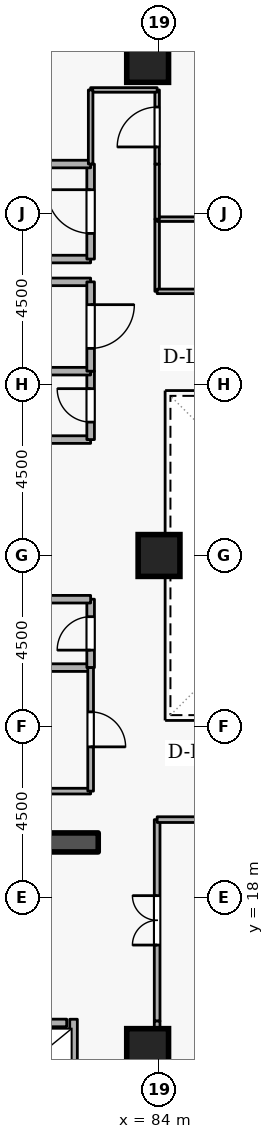
"""IFC4 building model, lengths in metres.
Left out: names, types, materials, properties, quantities, classifications, styles, units other than length and angle.
Written with IfcOpenShell. Run it as: python <this file> out.ifc"""

import sys

from ifc_helpers import new_model, si_unit, direction, frame, frame_2d, origin, origin_2d, place, context, subcontext, project, spatial, rectangle, extrude, element, fill, save


model = new_model("IFC4")
c1 = context("Model", 3, precision=1e-05, world=origin(), true_north=direction((0.0, 1.0)))
c2 = subcontext(c1, "Body", "Model", "MODEL_VIEW")
j1 = project(units=[si_unit("LENGTHUNIT", "METRE"), si_unit("PLANEANGLEUNIT", "RADIAN")], contexts=[c1])
p1 = place(None, origin())
s1 = spatial("IfcSite", under=j1, at=p1, CompositionType="ELEMENT")
p2 = place(p1, origin())
s2 = spatial("IfcBuilding", under=s1, at=p2, CompositionType="ELEMENT")
p3 = place(p2, frame((0.0, 0.0, 196.5)))
s3 = spatial("IfcBuildingStorey", under=s2, at=p3, CompositionType="ELEMENT", Elevation=196.5)
p4 = place(p3, frame((76.6, 19.45, 0.0), z_axis=(0.0, 0.0, 1.0), x_axis=(1.0, 0.0, 0.0)))
e1 = element("IfcWall", 1, at=p4, inside=s3, PredefinedType="SHEAR", context=c2, shape_type="SweptSolid", body=[
    extrude(rectangle(XDim=5.8, YDim=0.5, at=frame_2d((2.9, 0.0))), origin(), (0.0, 0.0, 1.0), 3.6),
])
for number, where, z_axis, x_axis in (
    (2, (83.7, 14.0, 0.0), (0.0, 0.0, 1.0), (1.0, 0.0, 0.0)),
    (3, (83.7, 40.0, 0.0), (0.0, 0.0, 1.0), (1.0, 0.0, 0.0)),
    (4, (84.0, 27.0, 0.0), (0.0, 0.0, 1.0), (1.0, 0.0, 0.0)),
):
    element("IfcColumn", number, at=place(p3, frame(where, z_axis=z_axis, x_axis=x_axis)), inside=s3, PredefinedType="COLUMN", context=c2, shape_type="SweptSolid", body=[
        extrude(rectangle(XDim=1.1, YDim=1.1, at=origin_2d()), origin(), (0.0, 0.0, 1.0), 3.6),
    ])
p5 = place(p3, frame((79.63, 14.7, 0.0), z_axis=(0.0, 0.0, 1.0), x_axis=(1.0, 0.0, 0.0)))
e5 = element("IfcWall", 5, at=p5, inside=s3, PredefinedType="STANDARD", context=c2, shape_type="SweptSolid", body=[
    extrude(rectangle(XDim=1.94, YDim=0.2, at=frame_2d((0.97, 0.0))), origin(), (0.0, 0.0, 1.0), 3.32),
])
p6 = place(p5, frame((0.46, 0.0, 0.0)))
e6 = element("IfcOpeningElement", 6, at=p6, cuts=e5, PredefinedType="OPENING", context=c2, shape_type="SweptSolid", body=[
    extrude(rectangle(XDim=1.02, YDim=2.06, at=frame_2d((0.51, 1.03))), frame((0.0, 0.11, 0.0), z_axis=(0.0, -1.0, 0.0), x_axis=(1.0, 0.0, 0.0)), (0.0, 0.0, 1.0), 0.22),
])
p7 = place(p3, frame((81.75, 12.612, 0.0), z_axis=(0.0, 0.0, 1.0), x_axis=(0.0, 1.0, 0.0)))
e7 = element("IfcWall", 7, at=p7, inside=s3, PredefinedType="STANDARD", context=c2, shape_type="SweptSolid", body=[
    extrude(rectangle(XDim=2.186, YDim=0.2, at=frame_2d((1.093, 0.0))), origin(), (0.0, 0.0, 1.0), 3.32),
])
p8 = place(p3, frame((79.9, 34.8, 0.0), z_axis=(0.0, 0.0, 1.0), x_axis=(1.0, 0.0, 0.0)))
e8 = element("IfcWall", 8, at=p8, inside=s3, PredefinedType="STANDARD", context=c2, shape_type="SweptSolid", body=[
    extrude(rectangle(XDim=2.3, YDim=0.2, at=frame_2d((1.15, 0.0))), origin(), (0.0, 0.0, 1.0), 2.525),
])
p9 = place(p3, frame((82.2, 34.8, 0.0), z_axis=(0.0, 0.0, 1.0), x_axis=(0.0, 1.0, 0.0)))
e9 = element("IfcWall", 9, at=p9, inside=s3, PredefinedType="STANDARD", context=c2, shape_type="SweptSolid", body=[
    extrude(rectangle(XDim=2.5, YDim=0.2, at=frame_2d((1.25, 0.0))), origin(), (0.0, 0.0, 1.0), 3.32),
])
p10 = place(p9, frame((0.675, 0.0, 0.0)))
e10 = element("IfcOpeningElement", 10, at=p10, cuts=e9, PredefinedType="OPENING", context=c2, shape_type="SweptSolid", body=[
    extrude(rectangle(XDim=1.15, YDim=2.1, at=frame_2d((0.575, 1.05))), frame((0.0, 0.11, 0.0), z_axis=(0.0, -1.0, 0.0), x_axis=(1.0, 0.0, 0.0)), (0.0, 0.0, 1.0), 0.22),
])
p11 = place(p3, frame((82.2, 37.3, 0.0), z_axis=(0.0, 0.0, 1.0), x_axis=(-1.0, 0.0, 0.0)))
e11 = element("IfcWall", 11, at=p11, inside=s3, PredefinedType="STANDARD", context=c2, shape_type="SweptSolid", body=[
    extrude(rectangle(XDim=5.7, YDim=0.2, at=frame_2d((2.85, 0.0))), origin(), (0.0, 0.0, 1.0), 3.32),
])
p12 = place(p3, frame((80.15, 24.05, 0.0), z_axis=(0.0, 0.0, 1.0), x_axis=(1.0, 0.0, 0.0)))
e12 = element("IfcWall", 12, at=p12, inside=s3, PredefinedType="STANDARD", context=c2, shape_type="SweptSolid", body=[
    extrude(rectangle(XDim=2.05, YDim=0.2, at=frame_2d((1.025, 0.0))), origin(), (0.0, 0.0, 1.0), 3.32),
])
p13 = place(p3, frame((82.2, 24.05, 0.0), z_axis=(0.0, 0.0, 1.0), x_axis=(0.0, 1.0, 0.0)))
e13 = element("IfcWall", 13, at=p13, inside=s3, PredefinedType="STANDARD", context=c2, shape_type="SweptSolid", body=[
    extrude(rectangle(XDim=1.8, YDim=0.2, at=frame_2d((0.9, 0.0))), origin(), (0.0, 0.0, 1.0), 3.32),
])
p14 = place(p13, frame((0.46, 0.0, 0.0)))
e14 = element("IfcOpeningElement", 14, at=p14, cuts=e13, PredefinedType="OPENING", context=c2, shape_type="SweptSolid", body=[
    extrude(rectangle(XDim=0.88, YDim=2.04, at=frame_2d((0.44, 1.02))), frame((0.0, 0.11, 0.0), z_axis=(0.0, -1.0, 0.0), x_axis=(1.0, 0.0, 0.0)), (0.0, 0.0, 1.0), 0.22),
])
for number, where, z_axis, x_axis in (
    (15, (82.2, 25.85, 0.0), (0.0, 0.0, 1.0), (-1.0, 0.0, 0.0)),
    (16, (80.15, 30.05, 0.0), (0.0, 0.0, 1.0), (1.0, 0.0, 0.0)),
):
    element("IfcWall", number, at=place(p3, frame(where, z_axis=z_axis, x_axis=x_axis)), inside=s3, PredefinedType="STANDARD", context=c2, shape_type="SweptSolid", body=[
        extrude(rectangle(XDim=2.05, YDim=0.2, at=frame_2d((1.025, 0.0))), origin(), (0.0, 0.0, 1.0), 3.32),
    ])
p15 = place(p3, frame((82.2, 30.05, 0.0), z_axis=(0.0, 0.0, 1.0), x_axis=(0.0, 1.0, 0.0)))
e17 = element("IfcWall", 17, at=p15, inside=s3, PredefinedType="STANDARD", context=c2, shape_type="SweptSolid", body=[
    extrude(rectangle(XDim=1.8, YDim=0.2, at=frame_2d((0.9, 0.0))), origin(), (0.0, 0.0, 1.0), 3.32),
])
p16 = place(p15, frame((0.46, 0.0, 0.0)))
e18 = element("IfcOpeningElement", 18, at=p16, cuts=e17, PredefinedType="OPENING", context=c2, shape_type="SweptSolid", body=[
    extrude(rectangle(XDim=0.88, YDim=2.04, at=frame_2d((0.44, 1.02))), frame((0.0, 0.11, 0.0), z_axis=(0.0, -1.0, 0.0), x_axis=(1.0, 0.0, 0.0)), (0.0, 0.0, 1.0), 0.22),
])
p17 = place(p3, frame((82.2, 31.85, 0.0), z_axis=(0.0, 0.0, 1.0), x_axis=(-1.0, 0.0, 0.0)))
e19 = element("IfcWall", 19, at=p17, inside=s3, PredefinedType="STANDARD", context=c2, shape_type="SweptSolid", body=[
    extrude(rectangle(XDim=2.05, YDim=0.2, at=frame_2d((1.025, 0.0))), origin(), (0.0, 0.0, 1.0), 3.32),
])
p18 = place(p3, frame((80.15, 34.2, 0.0), z_axis=(0.0, 0.0, 1.0), x_axis=(1.0, 0.0, 0.0)))
e20 = element("IfcWall", 20, at=p18, inside=s3, PredefinedType="STANDARD", context=c2, shape_type="SweptSolid", body=[
    extrude(rectangle(XDim=2.05, YDim=0.2, at=frame_2d((1.025, 0.0))), origin(), (0.0, 0.0, 1.0), 2.525),
])
p19 = place(p3, frame((82.2, 34.2, 0.0), z_axis=(0.0, 0.0, 1.0), x_axis=(0.0, -1.0, 0.0)))
e21 = element("IfcWall", 21, at=p19, inside=s3, PredefinedType="STANDARD", context=c2, shape_type="SweptSolid", body=[
    extrude(rectangle(XDim=2.35, YDim=0.2, at=frame_2d((1.175, 0.0))), origin(), (0.0, 0.0, 1.0), 3.32),
])
p20 = place(p19, frame((0.6, 0.0, 0.0)))
e22 = element("IfcOpeningElement", 22, at=p20, cuts=e21, PredefinedType="OPENING", context=c2, shape_type="SweptSolid", body=[
    extrude(rectangle(XDim=1.15, YDim=2.1, at=frame_2d((0.575, 1.05))), frame((0.0, 0.11, 0.0), z_axis=(0.0, -1.0, 0.0), x_axis=(1.0, 0.0, 0.0)), (0.0, 0.0, 1.0), 0.22),
])
p21 = place(p3, frame((82.2, 20.8, 0.0), z_axis=(0.0, 0.0, 1.0), x_axis=(-1.0, 0.0, 0.0)))
e23 = element("IfcWall", 23, at=p21, inside=s3, PredefinedType="PARTITIONING", context=c2, shape_type="SweptSolid", body=[
    extrude(rectangle(XDim=2.05, YDim=0.15, at=frame_2d((1.025, 0.0))), origin(), (0.0, 0.0, 1.0), 3.32),
])
p22 = place(p3, frame((82.2, 24.05, 0.0), z_axis=(0.0, 0.0, 1.0), x_axis=(0.0, -1.0, 0.0)))
e24 = element("IfcWall", 24, at=p22, inside=s3, PredefinedType="PARTITIONING", context=c2, shape_type="SweptSolid", body=[
    extrude(rectangle(XDim=3.25, YDim=0.15, at=frame_2d((1.625, 0.0))), origin(), (0.0, 0.0, 1.0), 3.32),
])
p23 = place(p22, frame((1.165, 0.0, 0.0)))
e25 = element("IfcOpeningElement", 25, at=p23, cuts=e24, PredefinedType="OPENING", context=c2, shape_type="SweptSolid", body=[
    extrude(rectangle(XDim=0.92, YDim=2.08, at=frame_2d((0.46, 1.04))), frame((0.0, 0.085, 0.0), z_axis=(0.0, -1.0, 0.0), x_axis=(1.0, 0.0, 0.0)), (0.0, 0.0, 1.0), 0.17),
])
p24 = place(p3, frame((83.95, 14.75, 0.0), z_axis=(0.0, 0.0, 1.0), x_axis=(0.0, 1.0, 0.0)))
e26 = element("IfcWall", 26, at=p24, inside=s3, PredefinedType="PARTITIONING", context=c2, shape_type="SweptSolid", body=[
    extrude(rectangle(XDim=5.3, YDim=0.15, at=frame_2d((2.65, 0.0))), origin(), (0.0, 0.0, 1.0), 3.32),
])
p25 = place(p24, frame((2.0, 0.0, 0.0)))
e27 = element("IfcOpeningElement", 27, at=p25, cuts=e26, PredefinedType="OPENING", context=c2, shape_type="SweptSolid", body=[
    extrude(rectangle(XDim=1.3, YDim=2.12, at=frame_2d((0.65, 1.06))), frame((0.0, 0.085, 0.0), z_axis=(0.0, -1.0, 0.0), x_axis=(1.0, 0.0, 0.0)), (0.0, 0.0, 1.0), 0.17),
])
p26 = place(p3, frame((83.95, 20.05, 0.0), z_axis=(0.0, 0.0, 1.0), x_axis=(1.0, 0.0, 0.0)))
e28 = element("IfcWall", 28, at=p26, inside=s3, PredefinedType="PARTITIONING", context=c2, shape_type="SweptSolid", body=[
    extrude(rectangle(XDim=2.25, YDim=0.15, at=frame_2d((1.125, 0.0))), origin(), (0.0, 0.0, 1.0), 3.32),
])
p27 = place(p3, frame((83.95, 12.4, 0.0), z_axis=(0.0, 0.0, 1.0), x_axis=(0.0, 1.0, 0.0)))
e29 = element("IfcWall", 29, at=p27, inside=s3, PredefinedType="PARTITIONING", context=c2, shape_type="SweptSolid", body=[
    extrude(rectangle(XDim=2.35, YDim=0.15, at=frame_2d((1.175, 0.0))), origin(), (0.0, 0.0, 1.0), 3.32),
])
p28 = place(p3, frame((83.95, 33.95, 0.0), z_axis=(0.0, 0.0, 1.0), x_axis=(0.0, 1.0, 0.0)))
e30 = element("IfcWall", 30, at=p28, inside=s3, PredefinedType="PARTITIONING", context=c2, shape_type="SweptSolid", body=[
    extrude(rectangle(XDim=1.9, YDim=0.12, at=frame_2d((0.95, 0.0))), origin(), (0.0, 0.0, 1.0), 3.32),
])
p29 = place(p3, frame((83.95, 35.85, 0.0), z_axis=(0.0, 0.0, 1.0), x_axis=(1.0, 0.0, 0.0)))
e31 = element("IfcWall", 31, at=p29, inside=s3, PredefinedType="PARTITIONING", context=c2, shape_type="SweptSolid", body=[
    extrude(rectangle(XDim=4.55, YDim=0.12, at=frame_2d((2.275, 0.0))), origin(), (0.0, 0.0, 1.0), 3.32),
])
p30 = place(p3, frame((88.5, 33.95, 0.0), z_axis=(0.0, 0.0, 1.0), x_axis=(-1.0, 0.0, 0.0)))
e32 = element("IfcWall", 32, at=p30, inside=s3, PredefinedType="PARTITIONING", context=c2, shape_type="SweptSolid", body=[
    extrude(rectangle(XDim=4.55, YDim=0.12, at=frame_2d((2.275, 0.0))), origin(), (0.0, 0.0, 1.0), 3.32),
])
p31 = place(p30, frame((1.8, 0.0, 0.0)))
e33 = element("IfcOpeningElement", 33, at=p31, cuts=e32, PredefinedType="OPENING", context=c2, shape_type="SweptSolid", body=[
    extrude(rectangle(XDim=0.95, YDim=2.1, at=frame_2d((0.475, 1.05))), frame((0.0, 0.07, 0.0), z_axis=(0.0, -1.0, 0.0), x_axis=(1.0, 0.0, 0.0)), (0.0, 0.0, 1.0), 0.14),
])
p32 = place(p3, frame((83.95, 35.85, 0.0), z_axis=(0.0, 0.0, 1.0), x_axis=(0.0, 1.0, 0.0)))
e34 = element("IfcWall", 34, at=p32, inside=s3, PredefinedType="PARTITIONING", context=c2, shape_type="SweptSolid", body=[
    extrude(rectangle(XDim=1.45, YDim=0.12, at=frame_2d((0.725, 0.0))), origin(), (0.0, 0.0, 1.0), 3.32),
])
p33 = place(p3, frame((83.95, 37.3, 0.0), z_axis=(0.0, 0.0, 1.0), x_axis=(0.0, 1.0, 0.0)))
e35 = element("IfcWall", 35, at=p33, inside=s3, PredefinedType="PARTITIONING", context=c2, shape_type="SweptSolid", body=[
    extrude(rectangle(XDim=1.95, YDim=0.12, at=frame_2d((0.975, 0.0))), origin(), (0.0, 0.0, 1.0), 3.32),
])
p34 = place(p33, frame((0.45, 0.0, 0.0)))
e36 = element("IfcOpeningElement", 36, at=p34, cuts=e35, PredefinedType="OPENING", context=c2, shape_type="SweptSolid", body=[
    extrude(rectangle(XDim=1.05, YDim=2.1, at=frame_2d((0.525, 1.05))), frame((0.0, 0.07, 0.0), z_axis=(0.0, -1.0, 0.0), x_axis=(1.0, 0.0, 0.0)), (0.0, 0.0, 1.0), 0.14),
])
p35 = place(p3, frame((83.95, 39.25, 0.0), z_axis=(0.0, 0.0, 1.0), x_axis=(-1.0, 0.0, 0.0)))
e37 = element("IfcWall", 37, at=p35, inside=s3, PredefinedType="PARTITIONING", context=c2, shape_type="SweptSolid", body=[
    extrude(rectangle(XDim=1.75, YDim=0.12, at=frame_2d((0.875, 0.0))), origin(), (0.0, 0.0, 1.0), 3.32),
])
p36 = place(p3, frame((82.2, 39.25, 0.0), z_axis=(0.0, 0.0, 1.0), x_axis=(0.0, -1.0, 0.0)))
e38 = element("IfcWall", 38, at=p36, inside=s3, PredefinedType="PARTITIONING", context=c2, shape_type="SweptSolid", body=[
    extrude(rectangle(XDim=1.95, YDim=0.12, at=frame_2d((0.975, 0.0))), origin(), (0.0, 0.0, 1.0), 3.32),
])
p37 = place(p10, origin())
e39 = element("IfcDoor", 39, at=p37, inside=s3, OperationType="SINGLE_SWING_RIGHT", PredefinedType="DOOR", context=c2, shape_type="SweptSolid", body=[
    extrude(rectangle(XDim=1.15, YDim=2.1, at=frame_2d((0.575, 1.05))), frame((0.0, 0.025, 0.0), z_axis=(0.0, -1.0, 0.0), x_axis=(1.0, 0.0, 0.0)), (0.0, 0.0, 1.0), 0.05),
])
fill(e10, e39)
p38 = place(p14, origin())
e40 = element("IfcDoor", 40, at=p38, inside=s3, OperationType="SINGLE_SWING_LEFT", PredefinedType="DOOR", context=c2, shape_type="SweptSolid", body=[
    extrude(rectangle(XDim=0.88, YDim=2.04, at=frame_2d((0.44, 1.02))), frame((0.0, 0.025, 0.0), z_axis=(0.0, -1.0, 0.0), x_axis=(1.0, 0.0, 0.0)), (0.0, 0.0, 1.0), 0.05),
])
fill(e14, e40)
p39 = place(p16, origin())
e41 = element("IfcDoor", 41, at=p39, inside=s3, OperationType="SINGLE_SWING_RIGHT", PredefinedType="DOOR", context=c2, shape_type="SweptSolid", body=[
    extrude(rectangle(XDim=0.88, YDim=2.04, at=frame_2d((0.44, 1.02))), frame((0.0, 0.025, 0.0), z_axis=(0.0, -1.0, 0.0), x_axis=(1.0, 0.0, 0.0)), (0.0, 0.0, 1.0), 0.05),
])
fill(e18, e41)
p40 = place(p23, origin())
e42 = element("IfcDoor", 42, at=p40, inside=s3, OperationType="SINGLE_SWING_RIGHT", PredefinedType="DOOR", context=c2, shape_type="SweptSolid", body=[
    extrude(rectangle(XDim=0.92, YDim=2.08, at=frame_2d((0.46, 1.04))), frame((0.0, 0.025, 0.0), z_axis=(0.0, -1.0, 0.0), x_axis=(1.0, 0.0, 0.0)), (0.0, 0.0, 1.0), 0.05),
])
fill(e25, e42)
p41 = place(p20, origin())
e43 = element("IfcDoor", 43, at=p41, inside=s3, OperationType="SINGLE_SWING_LEFT", PredefinedType="DOOR", context=c2, shape_type="SweptSolid", body=[
    extrude(rectangle(XDim=1.15, YDim=2.1, at=frame_2d((0.575, 1.05))), frame((0.0, 0.025, 0.0), z_axis=(0.0, -1.0, 0.0), x_axis=(1.0, 0.0, 0.0)), (0.0, 0.0, 1.0), 0.05),
])
fill(e22, e43)
p42 = place(p25, origin())
e44 = element("IfcDoor", 44, at=p42, inside=s3, OperationType="DOUBLE_DOOR_SINGLE_SWING", PredefinedType="DOOR", context=c2, shape_type="SweptSolid", body=[
    extrude(rectangle(XDim=1.3, YDim=2.12, at=frame_2d((0.65, 1.06))), frame((0.0, 0.025, 0.0), z_axis=(0.0, -1.0, 0.0), x_axis=(1.0, 0.0, 0.0)), (0.0, 0.0, 1.0), 0.05),
])
fill(e27, e44)
p43 = place(p34, origin())
e45 = element("IfcDoor", 45, at=p43, inside=s3, OperationType="SINGLE_SWING_LEFT", PredefinedType="DOOR", context=c2, shape_type="SweptSolid", body=[
    extrude(rectangle(XDim=1.05, YDim=2.1, at=frame_2d((0.525, 1.05))), frame((0.0, 0.025, 0.0), z_axis=(0.0, -1.0, 0.0), x_axis=(1.0, 0.0, 0.0)), (0.0, 0.0, 1.0), 0.05),
])
fill(e36, e45)
save(model, sys.argv[1])
